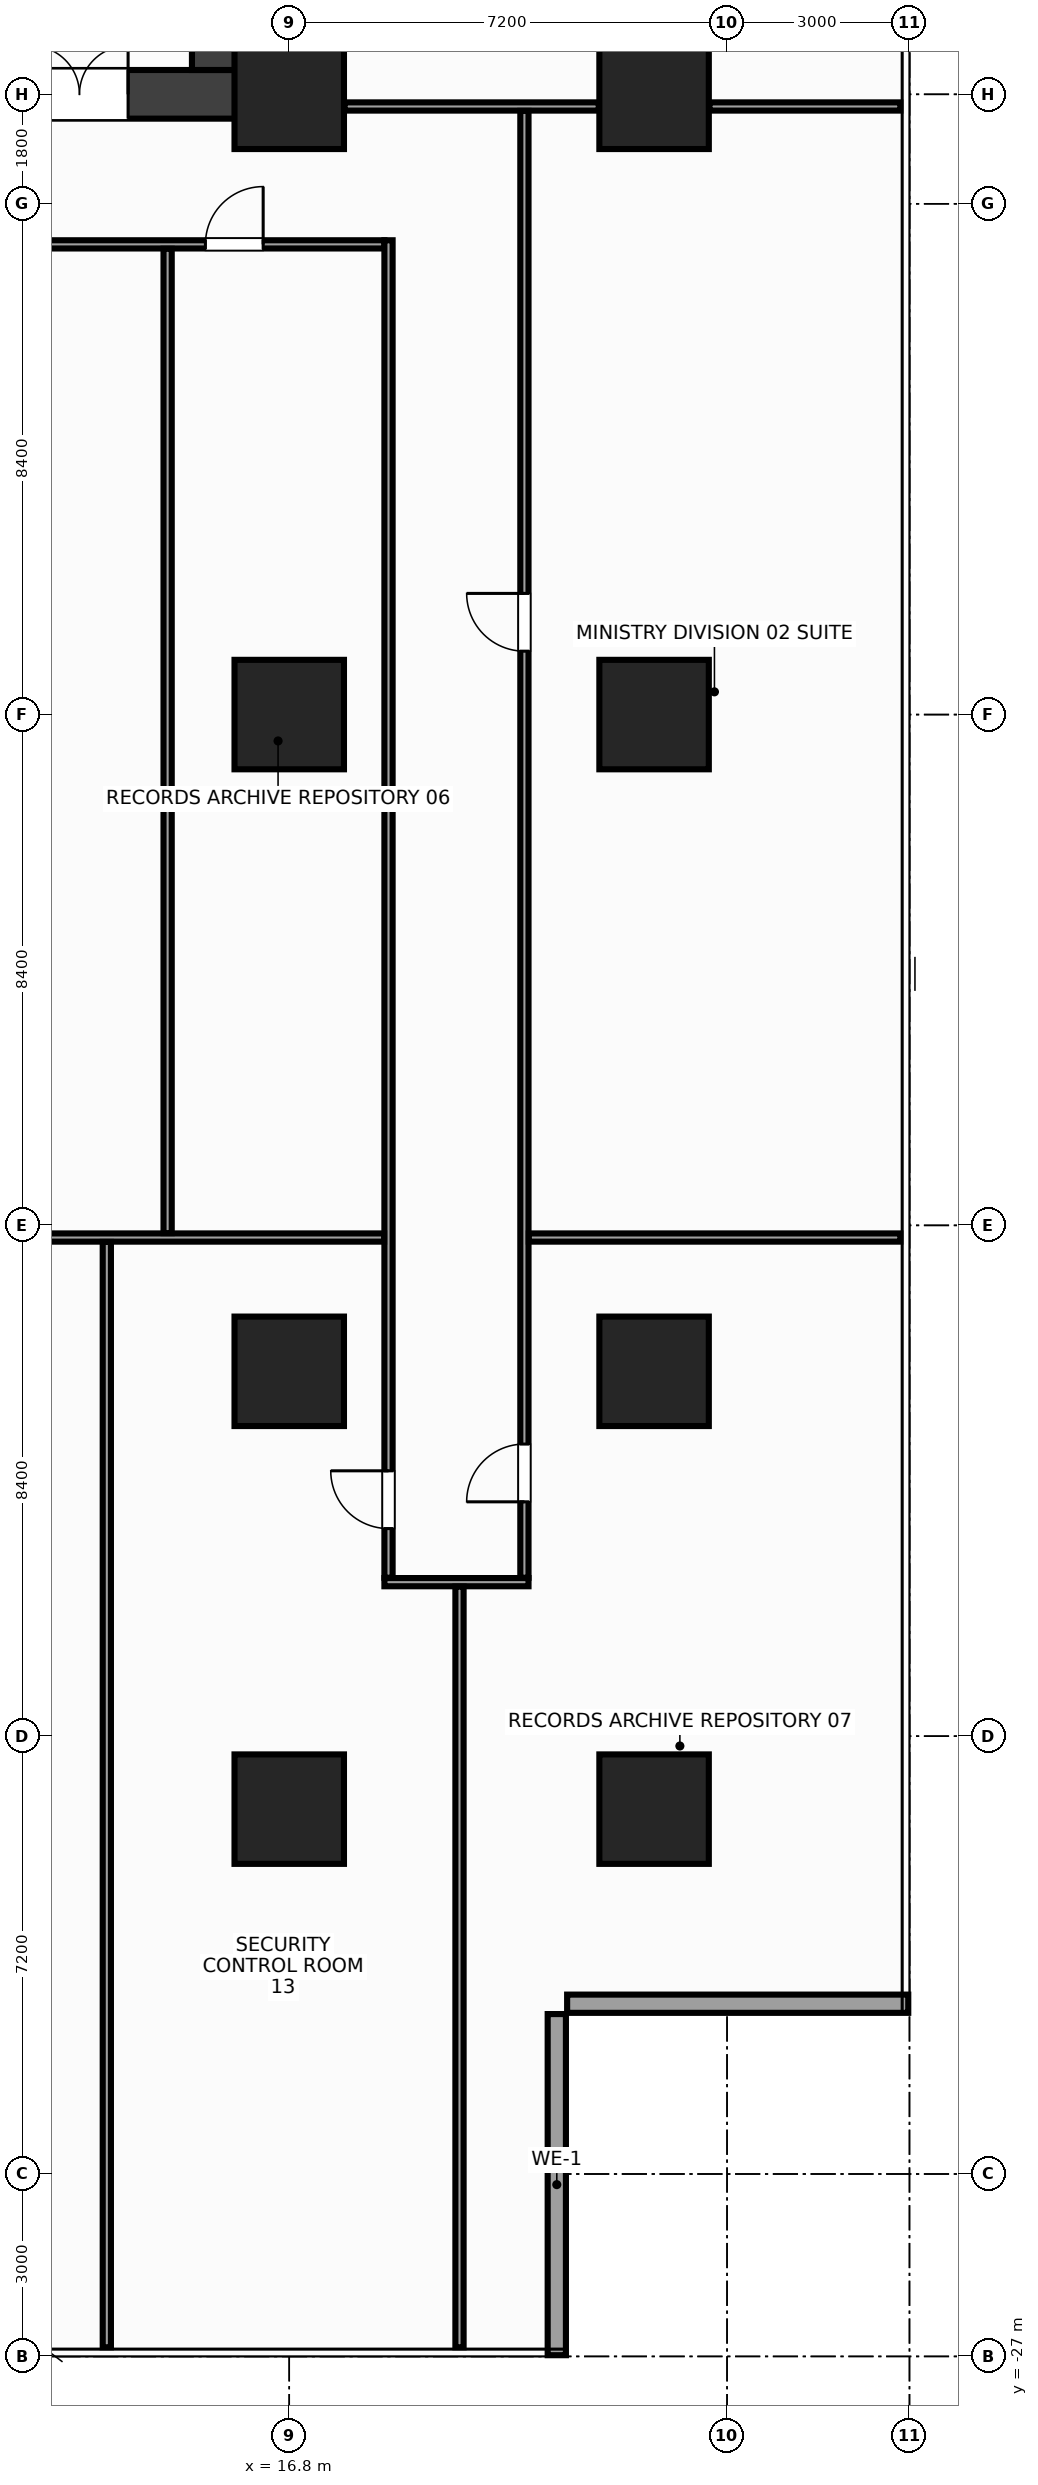
"""IFC4 building model, lengths in metres.
Left out: names, types, materials, properties, quantities, classifications, styles, units other than length and angle.
Written with IfcOpenShell. Run it as: python <this file> out.ifc"""

import sys

from ifc_helpers import new_model, si_unit, direction, frame, frame_2d, origin, origin_2d, place, context, subcontext, project, spatial, rectangle, extrude, source, transform, mapped, element, fill, save


model = new_model("IFC4")
c1 = context("Model", 3, precision=1e-05, world=origin(), true_north=direction((0.0, 1.0)))
c2 = subcontext(c1, "Body", "Model", "MODEL_VIEW")
j1 = project(units=[si_unit("LENGTHUNIT", "METRE"), si_unit("PLANEANGLEUNIT", "RADIAN")], contexts=[c1])
p1 = place(None, origin())
s1 = spatial("IfcSite", under=j1, at=p1, CompositionType="ELEMENT")
p2 = place(p1, origin())
s2 = spatial("IfcBuilding", under=s1, at=p2, CompositionType="ELEMENT")
p3 = place(p2, frame((0.0, 0.0, 34.4)))
s3 = spatial("IfcBuildingStorey", under=s2, at=p3, CompositionType="ELEMENT", Elevation=34.4)
m1 = source(origin(), c2, "Body", "SweptSolid", [
    extrude(rectangle(XDim=32.0, YDim=0.8, at=frame_2d((16.0, 0.0))), origin(), (0.0, 0.0, 1.0), 3.6),
])
p4 = place(p3, frame((-16.0, 10.2, 0.0), z_axis=(0.0, 0.0, 1.0), x_axis=(1.0, 0.0, 0.0)))
e1 = element("IfcWall", 1, at=p4, inside=s3, PredefinedType="SHEAR", context=c2, shape_type="MappedRepresentation", body=[
    mapped(m1, transform((0.0, 0.0, 0.0), x_axis=(1.0, 0.0, 0.0), y_axis=(0.0, 1.0, 0.0), z_axis=(0.0, 0.0, 1.0), scale=1.0)),
])
p5 = place(p4, frame((1.85, 0.0, 0.0)))
e2 = element("IfcOpeningElement", 2, at=p5, cuts=e1, PredefinedType="OPENING", context=c2, shape_type="SweptSolid", body=[
    extrude(rectangle(XDim=1.6, YDim=2.15, at=frame_2d((0.8, 1.075))), frame((0.0, 0.412, 0.0), z_axis=(0.0, -1.0, 0.0), x_axis=(1.0, 0.0, 0.0)), (0.0, 0.0, 1.0), 0.824),
])
p6 = place(p4, frame((28.55, 0.0, 0.0)))
e3 = element("IfcOpeningElement", 3, at=p6, cuts=e1, PredefinedType="OPENING", context=c2, shape_type="SweptSolid", body=[
    extrude(rectangle(XDim=1.6, YDim=2.15, at=frame_2d((0.8, 1.075))), frame((0.0, 0.412, 0.0), z_axis=(0.0, -1.0, 0.0), x_axis=(1.0, 0.0, 0.0)), (0.0, 0.0, 1.0), 0.824),
])
p7 = place(p4, frame((15.25, 0.0, 0.0)))
e4 = element("IfcOpeningElement", 4, at=p7, cuts=e1, PredefinedType="OPENING", context=c2, shape_type="SweptSolid", body=[
    extrude(rectangle(XDim=1.5, YDim=2.2, at=frame_2d((0.75, 1.1))), frame((0.0, 0.412, 0.0), z_axis=(0.0, -1.0, 0.0), x_axis=(1.0, 0.0, 0.0)), (0.0, 0.0, 1.0), 0.824),
])
m2 = source(origin(), c2, "Body", "SweptSolid", [
    extrude(rectangle(XDim=12.8, YDim=0.8, at=frame_2d((6.4, 0.0))), origin(), (0.0, 0.0, 1.0), 3.6),
])
p8 = place(p3, frame((15.6, 10.6, 0.0), z_axis=(0.0, 0.0, 1.0), x_axis=(0.0, 1.0, 0.0)))
e5 = element("IfcWall", 5, at=p8, inside=s3, PredefinedType="SHEAR", context=c2, shape_type="MappedRepresentation", body=[
    mapped(m2, transform((0.0, 0.0, 0.0), x_axis=(1.0, 0.0, 0.0), y_axis=(0.0, 1.0, 0.0), z_axis=(0.0, 0.0, 1.0), scale=1.0)),
])
m3 = source(origin(), c2, "Body", "SweptSolid", [
    extrude(rectangle(XDim=1.8, YDim=1.8, at=origin_2d()), origin(), (0.0, 0.0, 1.0), 3.6),
])
for number, where, z_axis, x_axis in (
    (6, (16.8, -18.0, 0.0), (0.0, 0.0, 1.0), (1.0, 0.0, 0.0)),
    (7, (16.8, -10.8, 0.0), (0.0, 0.0, 1.0), (1.0, 0.0, 0.0)),
    (8, (16.8, 0.0, 0.0), (0.0, 0.0, 1.0), (1.0, 0.0, 0.0)),
    (9, (16.8, 10.2, 0.0), (0.0, 0.0, 1.0), (1.0, 0.0, 0.0)),
    (10, (22.8, -18.0, 0.0), (0.0, 0.0, 1.0), (1.0, 0.0, 0.0)),
    (11, (22.8, -10.8, 0.0), (0.0, 0.0, 1.0), (1.0, 0.0, 0.0)),
    (12, (22.8, 0.0, 0.0), (0.0, 0.0, 1.0), (1.0, 0.0, 0.0)),
    (13, (22.8, 10.2, 0.0), (0.0, 0.0, 1.0), (1.0, 0.0, 0.0)),
):
    element("IfcColumn", number, at=place(p3, frame(where, z_axis=z_axis, x_axis=x_axis)), inside=s3, PredefinedType="COLUMN", context=c2, shape_type="MappedRepresentation", body=[
        mapped(m3, transform((0.0, 0.0, 0.0), x_axis=(1.0, 0.0, 0.0), y_axis=(0.0, 1.0, 0.0), z_axis=(0.0, 0.0, 1.0), scale=1.0)),
    ])
m4 = source(origin(), c2, "Body", "SweptSolid", [
    extrude(rectangle(XDim=5.61, YDim=0.3, at=frame_2d((2.805, 0.0))), origin(), (0.0, 0.0, 1.0), 2.74),
])
for number, where, z_axis, x_axis in (
    (14, (21.2, -26.98, 0.0), (0.0, 0.0, 1.0), (0.0, 1.0, 0.0)),
    (15, (21.37, -21.2, 0.0), (0.0, 0.0, 1.0), (1.0, 0.0, 0.0)),
):
    element("IfcWall", number, at=place(p3, frame(where, z_axis=z_axis, x_axis=x_axis)), inside=s3, PredefinedType="STANDARD", context=c2, shape_type="MappedRepresentation", body=[
        mapped(m4, transform((0.0, 0.0, 0.0), x_axis=(1.0, 0.0, 0.0), y_axis=(0.0, 1.0, 0.0), z_axis=(0.0, 0.0, 1.0), scale=1.0)),
    ])
m5 = source(origin(), c2, "Body", "SweptSolid", [
    extrude(rectangle(XDim=4.18, YDim=0.135, at=frame_2d((2.09, 0.0))), origin(), (0.0, 0.0, 1.0), 2.745),
])
p9 = place(p3, frame((17.71, 10.0, 0.0), z_axis=(0.0, 0.0, 1.0), x_axis=(1.0, 0.0, 0.0)))
e16 = element("IfcWall", 16, at=p9, inside=s3, PredefinedType="PARTITIONING", context=c2, shape_type="MappedRepresentation", body=[
    mapped(m5, transform((0.0, 0.0, 0.0), x_axis=(1.0, 0.0, 0.0), y_axis=(0.0, 1.0, 0.0), z_axis=(0.0, 0.0, 1.0), scale=1.0)),
])
m6 = source(origin(), c2, "Body", "SweptSolid", [
    extrude(rectangle(XDim=3.14, YDim=0.135, at=frame_2d((1.57, 0.0))), origin(), (0.0, 0.0, 1.0), 2.435),
])
p10 = place(p3, frame((23.71, 10.0, 0.0), z_axis=(0.0, 0.0, 1.0), x_axis=(1.0, 0.0, 0.0)))
e17 = element("IfcWall", 17, at=p10, inside=s3, PredefinedType="PARTITIONING", context=c2, shape_type="MappedRepresentation", body=[
    mapped(m6, transform((0.0, 0.0, 0.0), x_axis=(1.0, 0.0, 0.0), y_axis=(0.0, 1.0, 0.0), z_axis=(0.0, 0.0, 1.0), scale=1.0)),
])
m7 = source(origin(), c2, "Body", "SweptSolid", [
    extrude(rectangle(XDim=36.73, YDim=0.135, at=frame_2d((18.365, 0.0))), origin(), (0.0, 0.0, 1.0), 2.745),
])
p11 = place(p3, frame((-18.365, 7.732, 0.0), z_axis=(0.0, 0.0, 1.0), x_axis=(1.0, 0.0, 0.0)))
e18 = element("IfcWall", 18, at=p11, inside=s3, PredefinedType="PARTITIONING", context=c2, shape_type="MappedRepresentation", body=[
    mapped(m7, transform((0.0, 0.0, 0.0), x_axis=(1.0, 0.0, 0.0), y_axis=(0.0, 1.0, 0.0), z_axis=(0.0, 0.0, 1.0), scale=1.0)),
])
p12 = place(p11, frame((10.49, 0.0, 0.0)))
e19 = element("IfcOpeningElement", 19, at=p12, cuts=e18, PredefinedType="OPENING", context=c2, shape_type="SweptSolid", body=[
    extrude(rectangle(XDim=0.95, YDim=2.15, at=frame_2d((0.475, 1.075))), frame((0.0, 0.08, 0.0), z_axis=(0.0, -1.0, 0.0), x_axis=(1.0, 0.0, 0.0)), (0.0, 0.0, 1.0), 0.159),
])
p13 = place(p11, frame((25.29, 0.0, 0.0)))
e20 = element("IfcOpeningElement", 20, at=p13, cuts=e18, PredefinedType="OPENING", context=c2, shape_type="SweptSolid", body=[
    extrude(rectangle(XDim=0.95, YDim=2.15, at=frame_2d((0.475, 1.075))), frame((0.0, 0.08, 0.0), z_axis=(0.0, -1.0, 0.0), x_axis=(1.0, 0.0, 0.0)), (0.0, 0.0, 1.0), 0.159),
])
p14 = place(p11, frame((1.994, 0.0, 0.0)))
e21 = element("IfcOpeningElement", 21, at=p14, cuts=e18, PredefinedType="OPENING", context=c2, shape_type="SweptSolid", body=[
    extrude(rectangle(XDim=0.95, YDim=2.15, at=frame_2d((0.475, 1.075))), frame((0.0, 0.08, 0.0), z_axis=(0.0, -1.0, 0.0), x_axis=(1.0, 0.0, 0.0)), (0.0, 0.0, 1.0), 0.159),
])
p15 = place(p11, frame((33.786, 0.0, 0.0)))
e22 = element("IfcOpeningElement", 22, at=p15, cuts=e18, PredefinedType="OPENING", context=c2, shape_type="SweptSolid", body=[
    extrude(rectangle(XDim=0.95, YDim=2.15, at=frame_2d((0.475, 1.075))), frame((0.0, 0.08, 0.0), z_axis=(0.0, -1.0, 0.0), x_axis=(1.0, 0.0, 0.0)), (0.0, 0.0, 1.0), 0.159),
])
m8 = source(origin(), c2, "Body", "SweptSolid", [
    extrude(rectangle(XDim=2.37, YDim=0.135, at=frame_2d((1.185, 0.0))), origin(), (0.0, 0.0, 1.0), 3.045),
])
p16 = place(p3, frame((18.365, -14.268, 0.0), z_axis=(0.0, 0.0, 1.0), x_axis=(1.0, 0.0, 0.0)))
e23 = element("IfcWall", 23, at=p16, inside=s3, PredefinedType="PARTITIONING", context=c2, shape_type="MappedRepresentation", body=[
    mapped(m8, transform((0.0, 0.0, 0.0), x_axis=(1.0, 0.0, 0.0), y_axis=(0.0, 1.0, 0.0), z_axis=(0.0, 0.0, 1.0), scale=1.0)),
])
m9 = source(origin(), c2, "Body", "SweptSolid", [
    extrude(rectangle(XDim=21.995, YDim=0.135, at=frame_2d((10.998, 0.0))), origin(), (0.0, 0.0, 1.0), 2.745),
])
p17 = place(p3, frame((18.433, -14.195, 0.0), z_axis=(0.0, 0.0, 1.0), x_axis=(0.0, 1.0, 0.0)))
e24 = element("IfcWall", 24, at=p17, inside=s3, PredefinedType="PARTITIONING", context=c2, shape_type="MappedRepresentation", body=[
    mapped(m9, transform((0.0, 0.0, 0.0), x_axis=(1.0, 0.0, 0.0), y_axis=(0.0, 1.0, 0.0), z_axis=(0.0, 0.0, 1.0), scale=1.0)),
])
p18 = place(p17, frame((0.809, 0.0, 0.0)))
e25 = element("IfcOpeningElement", 25, at=p18, cuts=e24, PredefinedType="OPENING", context=c2, shape_type="SweptSolid", body=[
    extrude(rectangle(XDim=0.95, YDim=2.15, at=frame_2d((0.475, 1.075))), frame((0.0, 0.08, 0.0), z_axis=(0.0, -1.0, 0.0), x_axis=(1.0, 0.0, 0.0)), (0.0, 0.0, 1.0), 0.159),
])
m10 = source(origin(), c2, "Body", "SweptSolid", [
    extrude(rectangle(XDim=24.123, YDim=0.135, at=frame_2d((12.061, 0.0))), origin(), (0.0, 0.0, 1.0), 2.745),
])
p19 = place(p3, frame((20.667, -14.195, 0.0), z_axis=(0.0, 0.0, 1.0), x_axis=(0.0, 1.0, 0.0)))
e26 = element("IfcWall", 26, at=p19, inside=s3, PredefinedType="PARTITIONING", context=c2, shape_type="MappedRepresentation", body=[
    mapped(m10, transform((0.0, 0.0, 0.0), x_axis=(1.0, 0.0, 0.0), y_axis=(0.0, 1.0, 0.0), z_axis=(0.0, 0.0, 1.0), scale=1.0)),
])
p20 = place(p19, frame((15.238, 0.0, 0.0)))
e27 = element("IfcOpeningElement", 27, at=p20, cuts=e26, PredefinedType="OPENING", context=c2, shape_type="SweptSolid", body=[
    extrude(rectangle(XDim=0.95, YDim=2.15, at=frame_2d((0.475, 1.075))), frame((0.0, 0.08, 0.0), z_axis=(0.0, -1.0, 0.0), x_axis=(1.0, 0.0, 0.0)), (0.0, 0.0, 1.0), 0.159),
])
p21 = place(p19, frame((1.249, 0.0, 0.0)))
e28 = element("IfcOpeningElement", 28, at=p21, cuts=e26, PredefinedType="OPENING", context=c2, shape_type="SweptSolid", body=[
    extrude(rectangle(XDim=0.95, YDim=2.15, at=frame_2d((0.475, 1.075))), frame((0.0, 0.08, 0.0), z_axis=(0.0, -1.0, 0.0), x_axis=(1.0, 0.0, 0.0)), (0.0, 0.0, 1.0), 0.159),
])
m11 = source(origin(), c2, "Body", "SweptSolid", [
    extrude(rectangle(XDim=36.72, YDim=0.135, at=frame_2d((18.36, 0.0))), origin(), (0.0, 0.0, 1.0), 2.745),
])
p22 = place(p3, frame((-18.36, -8.6, 0.0), z_axis=(0.0, 0.0, 1.0), x_axis=(1.0, 0.0, 0.0)))
e29 = element("IfcWall", 29, at=p22, inside=s3, PredefinedType="PARTITIONING", context=c2, shape_type="MappedRepresentation", body=[
    mapped(m11, transform((0.0, 0.0, 0.0), x_axis=(1.0, 0.0, 0.0), y_axis=(0.0, 1.0, 0.0), z_axis=(0.0, 0.0, 1.0), scale=1.0)),
])
p23 = place(p22, frame((10.485, 0.0, 0.0)))
e30 = element("IfcOpeningElement", 30, at=p23, cuts=e29, PredefinedType="OPENING", context=c2, shape_type="SweptSolid", body=[
    extrude(rectangle(XDim=0.95, YDim=2.15, at=frame_2d((0.475, 1.075))), frame((0.0, 0.08, 0.0), z_axis=(0.0, -1.0, 0.0), x_axis=(1.0, 0.0, 0.0)), (0.0, 0.0, 1.0), 0.159),
])
p24 = place(p22, frame((16.285, 0.0, 0.0)))
e31 = element("IfcOpeningElement", 31, at=p24, cuts=e29, PredefinedType="OPENING", context=c2, shape_type="SweptSolid", body=[
    extrude(rectangle(XDim=0.95, YDim=2.15, at=frame_2d((0.475, 1.075))), frame((0.0, 0.08, 0.0), z_axis=(0.0, -1.0, 0.0), x_axis=(1.0, 0.0, 0.0)), (0.0, 0.0, 1.0), 0.159),
])
p25 = place(p22, frame((27.685, 0.0, 0.0)))
e32 = element("IfcOpeningElement", 32, at=p25, cuts=e29, PredefinedType="OPENING", context=c2, shape_type="SweptSolid", body=[
    extrude(rectangle(XDim=0.95, YDim=2.15, at=frame_2d((0.475, 1.075))), frame((0.0, 0.08, 0.0), z_axis=(0.0, -1.0, 0.0), x_axis=(1.0, 0.0, 0.0)), (0.0, 0.0, 1.0), 0.159),
])
m12 = source(origin(), c2, "Body", "SweptSolid", [
    extrude(rectangle(XDim=6.11, YDim=0.135, at=frame_2d((3.055, 0.0))), origin(), (0.0, 0.0, 1.0), 2.745),
])
p26 = place(p3, frame((20.74, -8.6, 0.0), z_axis=(0.0, 0.0, 1.0), x_axis=(1.0, 0.0, 0.0)))
e33 = element("IfcWall", 33, at=p26, inside=s3, PredefinedType="PARTITIONING", context=c2, shape_type="MappedRepresentation", body=[
    mapped(m12, transform((0.0, 0.0, 0.0), x_axis=(1.0, 0.0, 0.0), y_axis=(0.0, 1.0, 0.0), z_axis=(0.0, 0.0, 1.0), scale=1.0)),
])
m13 = source(origin(), c2, "Body", "SweptSolid", [
    extrude(rectangle(XDim=16.188, YDim=0.135, at=frame_2d((8.094, 0.0))), origin(), (0.0, 0.0, 1.0), 2.37),
])
p27 = place(p3, frame((14.8, -8.528, 0.0), z_axis=(0.0, 0.0, 1.0), x_axis=(0.0, 1.0, 0.0)))
e34 = element("IfcWall", 34, at=p27, inside=s3, PredefinedType="PARTITIONING", context=c2, shape_type="MappedRepresentation", body=[
    mapped(m13, transform((0.0, 0.0, 0.0), x_axis=(1.0, 0.0, 0.0), y_axis=(0.0, 1.0, 0.0), z_axis=(0.0, 0.0, 1.0), scale=1.0)),
])
m14 = source(origin(), c2, "Body", "SweptSolid", [
    extrude(rectangle(XDim=18.177, YDim=0.135, at=frame_2d((9.089, 0.0))), origin(), (0.0, 0.0, 1.0), 2.745),
])
p28 = place(p3, frame((13.8, -26.85, 0.0), z_axis=(0.0, 0.0, 1.0), x_axis=(0.0, 1.0, 0.0)))
e35 = element("IfcWall", 35, at=p28, inside=s3, PredefinedType="PARTITIONING", context=c2, shape_type="MappedRepresentation", body=[
    mapped(m14, transform((0.0, 0.0, 0.0), x_axis=(1.0, 0.0, 0.0), y_axis=(0.0, 1.0, 0.0), z_axis=(0.0, 0.0, 1.0), scale=1.0)),
])
m15 = source(origin(), c2, "Body", "SweptSolid", [
    extrude(rectangle(XDim=12.51, YDim=0.135, at=frame_2d((6.255, 0.0))), origin(), (0.0, 0.0, 1.0), 2.745),
])
p29 = place(p3, frame((19.6, -26.85, 0.0), z_axis=(0.0, 0.0, 1.0), x_axis=(0.0, 1.0, 0.0)))
e36 = element("IfcWall", 36, at=p29, inside=s3, PredefinedType="PARTITIONING", context=c2, shape_type="MappedRepresentation", body=[
    mapped(m15, transform((0.0, 0.0, 0.0), x_axis=(1.0, 0.0, 0.0), y_axis=(0.0, 1.0, 0.0), z_axis=(0.0, 0.0, 1.0), scale=1.0)),
])
m16 = source(origin(), c2, "Body", "SweptSolid", [
    extrude(rectangle(XDim=1.6, YDim=2.15, at=frame_2d((0.8, 1.075))), frame((0.0, 0.025, 0.0), z_axis=(0.0, -1.0, 0.0), x_axis=(1.0, 0.0, 0.0)), (0.0, 0.0, 1.0), 0.05),
])
p30 = place(p6, origin())
e37 = element("IfcDoor", 37, at=p30, inside=s3, OperationType="DOUBLE_DOOR_SINGLE_SWING", PredefinedType="DOOR", context=c2, shape_type="MappedRepresentation", body=[
    mapped(m16, transform((0.0, 0.0, 0.0), x_axis=(1.0, 0.0, 0.0), y_axis=(0.0, 1.0, 0.0), z_axis=(0.0, 0.0, 1.0), scale=1.0)),
])
fill(e3, e37)
m17 = source(origin(), c2, "Body", "SweptSolid", [
    extrude(rectangle(XDim=0.95, YDim=2.15, at=frame_2d((0.475, 1.075))), frame((0.0, 0.025, 0.0), z_axis=(0.0, -1.0, 0.0), x_axis=(1.0, 0.0, 0.0)), (0.0, 0.0, 1.0), 0.05),
])
p31 = place(p20, origin())
e38 = element("IfcDoor", 38, at=p31, inside=s3, OperationType="SINGLE_SWING_RIGHT", PredefinedType="DOOR", context=c2, shape_type="MappedRepresentation", body=[
    mapped(m17, transform((0.0, 0.0, 0.0), x_axis=(1.0, 0.0, 0.0), y_axis=(0.0, 1.0, 0.0), z_axis=(0.0, 0.0, 1.0), scale=1.0)),
])
fill(e27, e38)
p32 = place(p15, origin())
e39 = element("IfcDoor", 39, at=p32, inside=s3, OperationType="SINGLE_SWING_RIGHT", PredefinedType="DOOR", context=c2, shape_type="MappedRepresentation", body=[
    mapped(m17, transform((0.0, 0.0, 0.0), x_axis=(1.0, 0.0, 0.0), y_axis=(0.0, 1.0, 0.0), z_axis=(0.0, 0.0, 1.0), scale=1.0)),
])
fill(e22, e39)
p33 = place(p21, origin())
e40 = element("IfcDoor", 40, at=p33, inside=s3, OperationType="SINGLE_SWING_LEFT", PredefinedType="DOOR", context=c2, shape_type="MappedRepresentation", body=[
    mapped(m17, transform((0.0, 0.0, 0.0), x_axis=(1.0, 0.0, 0.0), y_axis=(0.0, 1.0, 0.0), z_axis=(0.0, 0.0, 1.0), scale=1.0)),
])
fill(e28, e40)
p34 = place(p18, origin())
e41 = element("IfcDoor", 41, at=p34, inside=s3, OperationType="SINGLE_SWING_RIGHT", PredefinedType="DOOR", context=c2, shape_type="MappedRepresentation", body=[
    mapped(m17, transform((0.0, 0.0, 0.0), x_axis=(1.0, 0.0, 0.0), y_axis=(0.0, 1.0, 0.0), z_axis=(0.0, 0.0, 1.0), scale=1.0)),
])
fill(e25, e41)
save(model, sys.argv[1])
